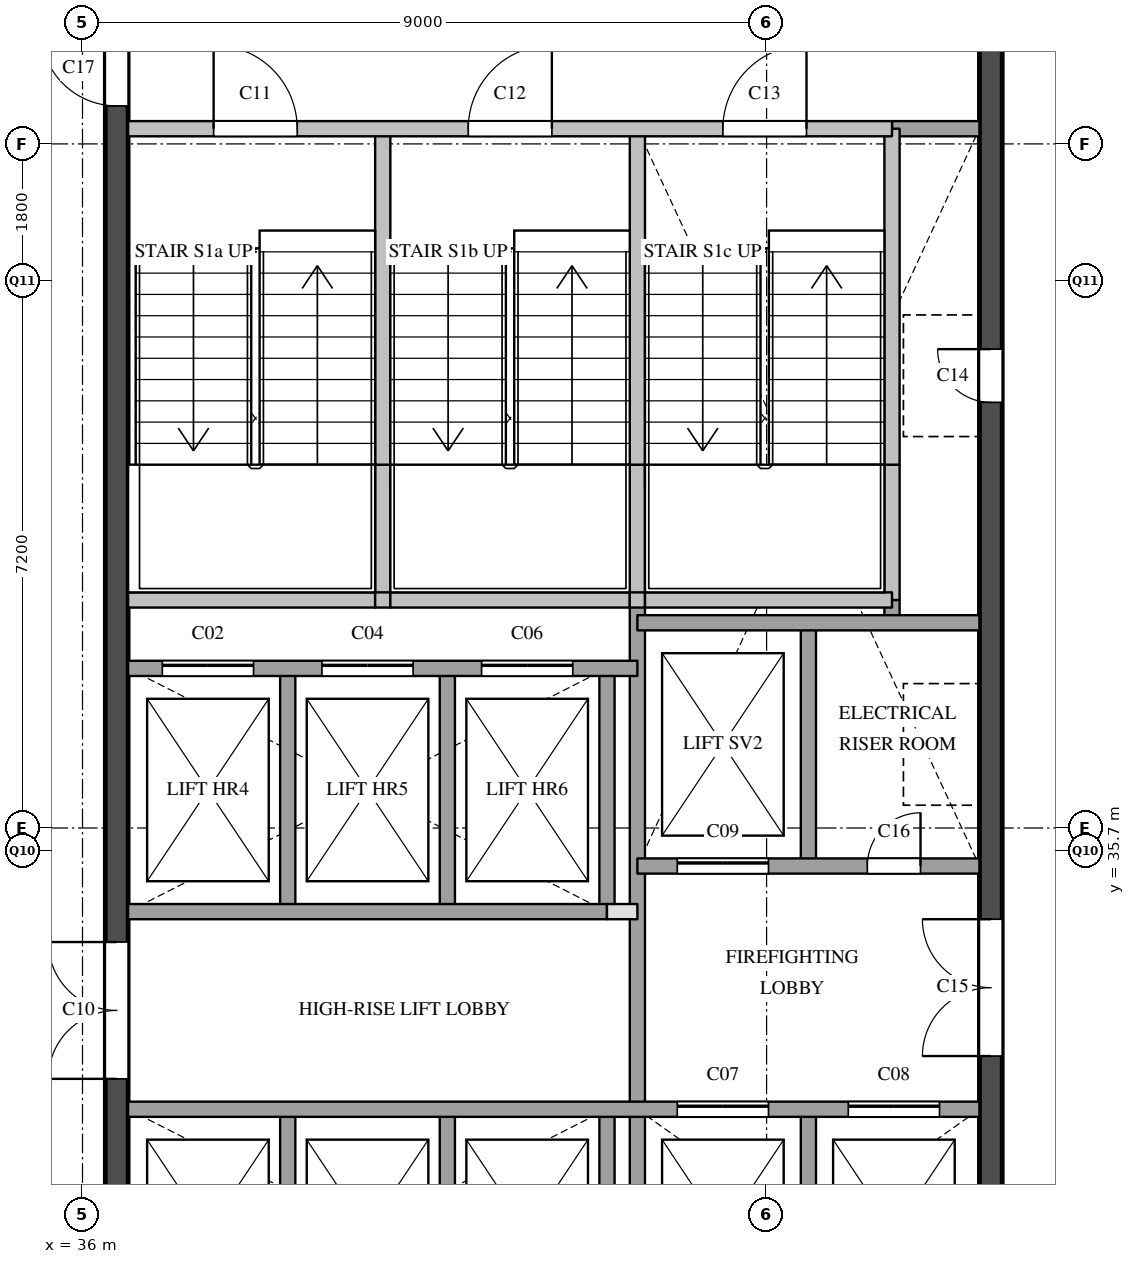
"""IFC4 building model, lengths in metres.
Left out: names, types, materials, properties, quantities, classifications, styles, units other than length and angle.
Written with IfcOpenShell. Run it as: python <this file> out.ifc"""

import sys

from ifc_helpers import new_model, si_unit, direction, frame, frame_2d, origin, place, context, subcontext, project, spatial, rectangle, extrude, element, fill, save


model = new_model("IFC4")
c1 = context("Model", 3, precision=1e-05, world=origin(), true_north=direction((0.0, 1.0)))
c2 = subcontext(c1, "Body", "Model", "MODEL_VIEW")
j1 = project(units=[si_unit("LENGTHUNIT", "METRE"), si_unit("PLANEANGLEUNIT", "RADIAN")], contexts=[c1])
p1 = place(None, origin())
s1 = spatial("IfcSite", under=j1, at=p1, CompositionType="ELEMENT")
p2 = place(p1, origin())
s2 = spatial("IfcBuilding", under=s1, at=p2, CompositionType="ELEMENT")
p3 = place(p2, frame((0.0, 0.0, 305.1)))
s3 = spatial("IfcBuildingStorey", under=s2, at=p3, CompositionType="ELEMENT", Elevation=305.1)
p4 = place(p3, frame((36.45, 29.1, 0.0), z_axis=(0.0, 0.0, 1.0), x_axis=(0.0, 1.0, 0.0)))
e1 = element("IfcWall", 1, at=p4, inside=s3, PredefinedType="SHEAR", context=c2, shape_type="SweptSolid", body=[
    extrude(rectangle(XDim=20.3, YDim=0.3, at=frame_2d((10.15, 0.0))), origin(), (0.0, 0.0, 1.0), 3.6),
])
p5 = place(p4, frame((3.6, 0.0, 0.0)))
e2 = element("IfcOpeningElement", 2, at=p5, cuts=e1, PredefinedType="OPENING", context=c2, shape_type="SweptSolid", body=[
    extrude(rectangle(XDim=1.8, YDim=2.1, at=frame_2d((0.9, 1.05))), frame((0.0, 0.16, 0.0), z_axis=(0.0, -1.0, 0.0), x_axis=(1.0, 0.0, 0.0)), (0.0, 0.0, 1.0), 0.32),
])
p6 = place(p4, frame((16.4, 0.0, 0.0)))
e3 = element("IfcOpeningElement", 3, at=p6, cuts=e1, PredefinedType="OPENING", context=c2, shape_type="SweptSolid", body=[
    extrude(rectangle(XDim=1.0, YDim=2.1, at=frame_2d((0.5, 1.05))), frame((0.0, 0.16, 0.0), z_axis=(0.0, -1.0, 0.0), x_axis=(1.0, 0.0, 0.0)), (0.0, 0.0, 1.0), 0.32),
])
p7 = place(p3, frame((47.95, 29.1, 0.0), z_axis=(0.0, 0.0, 1.0), x_axis=(0.0, 1.0, 0.0)))
e4 = element("IfcWall", 4, at=p7, inside=s3, PredefinedType="SHEAR", context=c2, shape_type="SweptSolid", body=[
    extrude(rectangle(XDim=20.3, YDim=0.3, at=frame_2d((10.15, 0.0))), origin(), (0.0, 0.0, 1.0), 3.6),
])
p8 = place(p7, frame((12.5, 0.0, 0.0)))
e5 = element("IfcOpeningElement", 5, at=p8, cuts=e4, PredefinedType="OPENING", context=c2, shape_type="SweptSolid", body=[
    extrude(rectangle(XDim=0.7, YDim=2.1, at=frame_2d((0.35, 1.05))), frame((0.0, 0.16, 0.0), z_axis=(0.0, -1.0, 0.0), x_axis=(1.0, 0.0, 0.0)), (0.0, 0.0, 1.0), 0.32),
])
p9 = place(p7, frame((3.9, 0.0, 0.0)))
e6 = element("IfcOpeningElement", 6, at=p9, cuts=e4, PredefinedType="OPENING", context=c2, shape_type="SweptSolid", body=[
    extrude(rectangle(XDim=1.8, YDim=2.1, at=frame_2d((0.9, 1.05))), frame((0.0, 0.16, 0.0), z_axis=(0.0, -1.0, 0.0), x_axis=(1.0, 0.0, 0.0)), (0.0, 0.0, 1.0), 0.32),
])
p10 = place(p3, frame((38.7, 29.1, 0.0), z_axis=(0.0, 0.0, 1.0), x_axis=(0.0, 1.0, 0.0)))
e7 = element("IfcWall", 7, at=p10, inside=s3, PredefinedType="SOLIDWALL", context=c2, shape_type="SweptSolid", body=[
    extrude(rectangle(XDim=3.2, YDim=0.2, at=frame_2d((1.6, 0.0))), origin(), (0.0, 0.0, 1.0), 3.6),
])
p11 = place(p3, frame((38.7, 34.9, 0.0), z_axis=(0.0, 0.0, 1.0), x_axis=(0.0, 1.0, 0.0)))
e8 = element("IfcWall", 8, at=p11, inside=s3, PredefinedType="SOLIDWALL", context=c2, shape_type="SweptSolid", body=[
    extrude(rectangle(XDim=3.2, YDim=0.2, at=frame_2d((1.6, 0.0))), origin(), (0.0, 0.0, 1.0), 3.6),
])
p12 = place(p3, frame((39.95, 39.0, 0.0), z_axis=(0.0, 0.0, 1.0), x_axis=(0.0, 1.0, 0.0)))
e9 = element("IfcWall", 9, at=p12, inside=s3, PredefinedType="SOLIDWALL", context=c2, shape_type="SweptSolid", body=[
    extrude(rectangle(XDim=1.78, YDim=0.2, at=frame_2d((0.89, 0.0))), origin(), (0.0, 0.0, 1.0), 3.6),
])
p13 = place(p3, frame((39.95, 40.78, 0.0), z_axis=(0.0, 0.0, 1.0), x_axis=(0.0, 1.0, 0.0)))
e10 = element("IfcWall", 10, at=p13, inside=s3, PredefinedType="SOLIDWALL", context=c2, shape_type="SweptSolid", body=[
    extrude(rectangle(XDim=4.42, YDim=0.2, at=frame_2d((2.21, 0.0))), origin(), (0.0, 0.0, 1.0), 3.6),
])
p14 = place(p3, frame((40.8, 29.1, 0.0), z_axis=(0.0, 0.0, 1.0), x_axis=(0.0, 1.0, 0.0)))
e11 = element("IfcWall", 11, at=p14, inside=s3, PredefinedType="SOLIDWALL", context=c2, shape_type="SweptSolid", body=[
    extrude(rectangle(XDim=3.2, YDim=0.2, at=frame_2d((1.6, 0.0))), origin(), (0.0, 0.0, 1.0), 3.6),
])
p15 = place(p3, frame((40.8, 34.9, 0.0), z_axis=(0.0, 0.0, 1.0), x_axis=(0.0, 1.0, 0.0)))
e12 = element("IfcWall", 12, at=p15, inside=s3, PredefinedType="SOLIDWALL", context=c2, shape_type="SweptSolid", body=[
    extrude(rectangle(XDim=3.2, YDim=0.2, at=frame_2d((1.6, 0.0))), origin(), (0.0, 0.0, 1.0), 3.6),
])
p16 = place(p3, frame((42.9, 29.1, 0.0), z_axis=(0.0, 0.0, 1.0), x_axis=(0.0, 1.0, 0.0)))
e13 = element("IfcWall", 13, at=p16, inside=s3, PredefinedType="SOLIDWALL", context=c2, shape_type="SweptSolid", body=[
    extrude(rectangle(XDim=3.2, YDim=0.2, at=frame_2d((1.6, 0.0))), origin(), (0.0, 0.0, 1.0), 3.6),
])
p17 = place(p3, frame((42.9, 34.9, 0.0), z_axis=(0.0, 0.0, 1.0), x_axis=(0.0, 1.0, 0.0)))
e14 = element("IfcWall", 14, at=p17, inside=s3, PredefinedType="SOLIDWALL", context=c2, shape_type="SweptSolid", body=[
    extrude(rectangle(XDim=3.2, YDim=0.2, at=frame_2d((1.6, 0.0))), origin(), (0.0, 0.0, 1.0), 3.6),
])
p18 = place(p3, frame((43.3, 29.1, 0.0), z_axis=(0.0, 0.0, 1.0), x_axis=(0.0, 1.0, 0.0)))
e15 = element("IfcWall", 15, at=p18, inside=s3, PredefinedType="SOLIDWALL", context=c2, shape_type="SweptSolid", body=[
    extrude(rectangle(XDim=9.9, YDim=0.2, at=frame_2d((4.95, 0.0))), origin(), (0.0, 0.0, 1.0), 3.6),
])
p19 = place(p3, frame((43.3, 39.0, 0.0), z_axis=(0.0, 0.0, 1.0), x_axis=(0.0, 1.0, 0.0)))
e16 = element("IfcWall", 16, at=p19, inside=s3, PredefinedType="SOLIDWALL", context=c2, shape_type="SweptSolid", body=[
    extrude(rectangle(XDim=1.78, YDim=0.2, at=frame_2d((0.89, 0.0))), origin(), (0.0, 0.0, 1.0), 3.6),
])
p20 = place(p3, frame((43.3, 40.78, 0.0), z_axis=(0.0, 0.0, 1.0), x_axis=(0.0, 1.0, 0.0)))
e17 = element("IfcWall", 17, at=p20, inside=s3, PredefinedType="SOLIDWALL", context=c2, shape_type="SweptSolid", body=[
    extrude(rectangle(XDim=4.42, YDim=0.2, at=frame_2d((2.21, 0.0))), origin(), (0.0, 0.0, 1.0), 3.6),
])
for number, where, z_axis, x_axis in (
    (18, (45.55, 29.1, 0.0), (0.0, 0.0, 1.0), (0.0, 1.0, 0.0)),
    (19, (45.55, 35.5, 0.0), (0.0, 0.0, 1.0), (0.0, 1.0, 0.0)),
):
    element("IfcWall", number, at=place(p3, frame(where, z_axis=z_axis, x_axis=x_axis)), inside=s3, PredefinedType="SOLIDWALL", context=c2, shape_type="SweptSolid", body=[
        extrude(rectangle(XDim=3.2, YDim=0.2, at=frame_2d((1.6, 0.0))), origin(), (0.0, 0.0, 1.0), 3.6),
    ])
p21 = place(p3, frame((46.65, 38.7, 0.0), z_axis=(0.0, 0.0, 1.0), x_axis=(0.0, 1.0, 0.0)))
e20 = element("IfcWall", 20, at=p21, inside=s3, PredefinedType="SOLIDWALL", context=c2, shape_type="SweptSolid", body=[
    extrude(rectangle(XDim=0.3, YDim=0.2, at=frame_2d((0.15, 0.0))), origin(), (0.0, 0.0, 1.0), 3.6),
])
p22 = place(p3, frame((46.65, 39.0, 0.0), z_axis=(0.0, 0.0, 1.0), x_axis=(0.0, 1.0, 0.0)))
e21 = element("IfcWall", 21, at=p22, inside=s3, PredefinedType="SOLIDWALL", context=c2, shape_type="SweptSolid", body=[
    extrude(rectangle(XDim=1.78, YDim=0.2, at=frame_2d((0.89, 0.0))), origin(), (0.0, 0.0, 1.0), 3.6),
])
p23 = place(p3, frame((46.65, 40.78, 0.0), z_axis=(0.0, 0.0, 1.0), x_axis=(0.0, 1.0, 0.0)))
e22 = element("IfcWall", 22, at=p23, inside=s3, PredefinedType="SOLIDWALL", context=c2, shape_type="SweptSolid", body=[
    extrude(rectangle(XDim=4.42, YDim=0.2, at=frame_2d((2.21, 0.0))), origin(), (0.0, 0.0, 1.0), 3.6),
])
p24 = place(p3, frame((36.6, 32.3, 0.0), z_axis=(0.0, 0.0, 1.0), x_axis=(1.0, 0.0, 0.0)))
e23 = element("IfcWall", 23, at=p24, inside=s3, PredefinedType="SOLIDWALL", context=c2, shape_type="SweptSolid", body=[
    extrude(rectangle(XDim=11.2, YDim=0.2, at=frame_2d((5.6, 0.0))), origin(), (0.0, 0.0, 1.0), 3.6),
])
p25 = place(p24, frame((7.225, 0.0, 0.0)))
e24 = element("IfcOpeningElement", 24, at=p25, cuts=e23, PredefinedType="OPENING", context=c2, shape_type="SweptSolid", body=[
    extrude(rectangle(XDim=1.2, YDim=2.1, at=frame_2d((0.6, 1.05))), frame((0.0, 0.11, 0.0), z_axis=(0.0, -1.0, 0.0), x_axis=(1.0, 0.0, 0.0)), (0.0, 0.0, 1.0), 0.22),
])
p26 = place(p24, frame((9.475, 0.0, 0.0)))
e25 = element("IfcOpeningElement", 25, at=p26, cuts=e23, PredefinedType="OPENING", context=c2, shape_type="SweptSolid", body=[
    extrude(rectangle(XDim=1.2, YDim=2.1, at=frame_2d((0.6, 1.05))), frame((0.0, 0.11, 0.0), z_axis=(0.0, -1.0, 0.0), x_axis=(1.0, 0.0, 0.0)), (0.0, 0.0, 1.0), 0.22),
])
p27 = place(p3, frame((42.9, 34.9, 0.0), z_axis=(0.0, 0.0, 1.0), x_axis=(1.0, 0.0, 0.0)))
e26 = element("IfcWall", 26, at=p27, inside=s3, PredefinedType="PARTITIONING", context=c2, shape_type="SweptSolid", body=[
    extrude(rectangle(XDim=0.4, YDim=0.2, at=frame_2d((0.2, 0.0))), origin(), (0.0, 0.0, 1.0), 3.6),
])
p28 = place(p3, frame((36.6, 34.9, 0.0), z_axis=(0.0, 0.0, 1.0), x_axis=(1.0, 0.0, 0.0)))
e27 = element("IfcWall", 27, at=p28, inside=s3, PredefinedType="SOLIDWALL", context=c2, shape_type="SweptSolid", body=[
    extrude(rectangle(XDim=6.3, YDim=0.2, at=frame_2d((3.15, 0.0))), origin(), (0.0, 0.0, 1.0), 3.6),
])
p29 = place(p3, frame((43.3, 35.5, 0.0), z_axis=(0.0, 0.0, 1.0), x_axis=(1.0, 0.0, 0.0)))
e28 = element("IfcWall", 28, at=p29, inside=s3, PredefinedType="SOLIDWALL", context=c2, shape_type="SweptSolid", body=[
    extrude(rectangle(XDim=4.5, YDim=0.2, at=frame_2d((2.25, 0.0))), origin(), (0.0, 0.0, 1.0), 3.6),
])
p30 = place(p29, frame((0.525, 0.0, 0.0)))
e29 = element("IfcOpeningElement", 29, at=p30, cuts=e28, PredefinedType="OPENING", context=c2, shape_type="SweptSolid", body=[
    extrude(rectangle(XDim=1.2, YDim=2.1, at=frame_2d((0.6, 1.05))), frame((0.0, 0.11, 0.0), z_axis=(0.0, -1.0, 0.0), x_axis=(1.0, 0.0, 0.0)), (0.0, 0.0, 1.0), 0.22),
])
p31 = place(p29, frame((3.025, 0.0, 0.0)))
e30 = element("IfcOpeningElement", 30, at=p31, cuts=e28, PredefinedType="OPENING", context=c2, shape_type="SweptSolid", body=[
    extrude(rectangle(XDim=0.7, YDim=2.1, at=frame_2d((0.35, 1.05))), frame((0.0, 0.11, 0.0), z_axis=(0.0, -1.0, 0.0), x_axis=(1.0, 0.0, 0.0)), (0.0, 0.0, 1.0), 0.22),
])
p32 = place(p3, frame((36.6, 38.1, 0.0), z_axis=(0.0, 0.0, 1.0), x_axis=(1.0, 0.0, 0.0)))
e31 = element("IfcWall", 31, at=p32, inside=s3, PredefinedType="SOLIDWALL", context=c2, shape_type="SweptSolid", body=[
    extrude(rectangle(XDim=6.7, YDim=0.2, at=frame_2d((3.35, 0.0))), origin(), (0.0, 0.0, 1.0), 3.6),
])
p33 = place(p32, frame((0.45, 0.0, 0.0)))
e32 = element("IfcOpeningElement", 32, at=p33, cuts=e31, PredefinedType="OPENING", context=c2, shape_type="SweptSolid", body=[
    extrude(rectangle(XDim=1.2, YDim=2.1, at=frame_2d((0.6, 1.05))), frame((0.0, 0.11, 0.0), z_axis=(0.0, -1.0, 0.0), x_axis=(1.0, 0.0, 0.0)), (0.0, 0.0, 1.0), 0.22),
])
p34 = place(p32, frame((2.55, 0.0, 0.0)))
e33 = element("IfcOpeningElement", 33, at=p34, cuts=e31, PredefinedType="OPENING", context=c2, shape_type="SweptSolid", body=[
    extrude(rectangle(XDim=1.2, YDim=2.1, at=frame_2d((0.6, 1.05))), frame((0.0, 0.11, 0.0), z_axis=(0.0, -1.0, 0.0), x_axis=(1.0, 0.0, 0.0)), (0.0, 0.0, 1.0), 0.22),
])
p35 = place(p32, frame((4.65, 0.0, 0.0)))
e34 = element("IfcOpeningElement", 34, at=p35, cuts=e31, PredefinedType="OPENING", context=c2, shape_type="SweptSolid", body=[
    extrude(rectangle(XDim=1.2, YDim=2.1, at=frame_2d((0.6, 1.05))), frame((0.0, 0.11, 0.0), z_axis=(0.0, -1.0, 0.0), x_axis=(1.0, 0.0, 0.0)), (0.0, 0.0, 1.0), 0.22),
])
p36 = place(p3, frame((43.3, 38.7, 0.0), z_axis=(0.0, 0.0, 1.0), x_axis=(1.0, 0.0, 0.0)))
e35 = element("IfcWall", 35, at=p36, inside=s3, PredefinedType="SOLIDWALL", context=c2, shape_type="SweptSolid", body=[
    extrude(rectangle(XDim=4.5, YDim=0.2, at=frame_2d((2.25, 0.0))), origin(), (0.0, 0.0, 1.0), 3.6),
])
p37 = place(p3, frame((36.6, 39.0, 0.0), z_axis=(0.0, 0.0, 1.0), x_axis=(1.0, 0.0, 0.0)))
e36 = element("IfcWall", 36, at=p37, inside=s3, PredefinedType="SOLIDWALL", context=c2, shape_type="SweptSolid", body=[
    extrude(rectangle(XDim=3.25, YDim=0.2, at=frame_2d((1.625, 0.0))), origin(), (0.0, 0.0, 1.0), 3.6),
])
p38 = place(p3, frame((39.85, 39.0, 0.0), z_axis=(0.0, 0.0, 1.0), x_axis=(1.0, 0.0, 0.0)))
e37 = element("IfcWall", 37, at=p38, inside=s3, PredefinedType="SOLIDWALL", context=c2, shape_type="SweptSolid", body=[
    extrude(rectangle(XDim=0.2, YDim=0.2, at=frame_2d((0.1, 0.0))), origin(), (0.0, 0.0, 1.0), 3.6),
])
p39 = place(p3, frame((40.05, 39.0, 0.0), z_axis=(0.0, 0.0, 1.0), x_axis=(1.0, 0.0, 0.0)))
e38 = element("IfcWall", 38, at=p39, inside=s3, PredefinedType="SOLIDWALL", context=c2, shape_type="SweptSolid", body=[
    extrude(rectangle(XDim=3.15, YDim=0.2, at=frame_2d((1.575, 0.0))), origin(), (0.0, 0.0, 1.0), 3.6),
])
p40 = place(p3, frame((43.2, 39.0, 0.0), z_axis=(0.0, 0.0, 1.0), x_axis=(1.0, 0.0, 0.0)))
e39 = element("IfcWall", 39, at=p40, inside=s3, PredefinedType="SOLIDWALL", context=c2, shape_type="SweptSolid", body=[
    extrude(rectangle(XDim=0.2, YDim=0.2, at=frame_2d((0.1, 0.0))), origin(), (0.0, 0.0, 1.0), 3.6),
])
p41 = place(p3, frame((43.4, 39.0, 0.0), z_axis=(0.0, 0.0, 1.0), x_axis=(1.0, 0.0, 0.0)))
e40 = element("IfcWall", 40, at=p41, inside=s3, PredefinedType="SOLIDWALL", context=c2, shape_type="SweptSolid", body=[
    extrude(rectangle(XDim=3.25, YDim=0.2, at=frame_2d((1.625, 0.0))), origin(), (0.0, 0.0, 1.0), 3.6),
])
p42 = place(p3, frame((46.65, 45.2, 0.0), z_axis=(0.0, 0.0, 1.0), x_axis=(1.0, 0.0, 0.0)))
e41 = element("IfcWall", 41, at=p42, inside=s3, PredefinedType="SOLIDWALL", context=c2, shape_type="SweptSolid", body=[
    extrude(rectangle(XDim=1.15, YDim=0.2, at=frame_2d((0.575, 0.0))), origin(), (0.0, 0.0, 1.0), 3.6),
])
p43 = place(p3, frame((36.6, 45.2, 0.0), z_axis=(0.0, 0.0, 1.0), x_axis=(1.0, 0.0, 0.0)))
e42 = element("IfcWall", 42, at=p43, inside=s3, PredefinedType="SOLIDWALL", context=c2, shape_type="SweptSolid", body=[
    extrude(rectangle(XDim=10.05, YDim=0.2, at=frame_2d((5.025, 0.0))), origin(), (0.0, 0.0, 1.0), 3.6),
])
p44 = place(p43, frame((1.125, 0.0, 0.0)))
e43 = element("IfcOpeningElement", 43, at=p44, cuts=e42, PredefinedType="OPENING", context=c2, shape_type="SweptSolid", body=[
    extrude(rectangle(XDim=1.1, YDim=2.1, at=frame_2d((0.55, 1.05))), frame((0.0, 0.11, 0.0), z_axis=(0.0, -1.0, 0.0), x_axis=(1.0, 0.0, 0.0)), (0.0, 0.0, 1.0), 0.22),
])
p45 = place(p43, frame((4.475, 0.0, 0.0)))
e44 = element("IfcOpeningElement", 44, at=p45, cuts=e42, PredefinedType="OPENING", context=c2, shape_type="SweptSolid", body=[
    extrude(rectangle(XDim=1.1, YDim=2.1, at=frame_2d((0.55, 1.05))), frame((0.0, 0.11, 0.0), z_axis=(0.0, -1.0, 0.0), x_axis=(1.0, 0.0, 0.0)), (0.0, 0.0, 1.0), 0.22),
])
p46 = place(p43, frame((7.825, 0.0, 0.0)))
e45 = element("IfcOpeningElement", 45, at=p46, cuts=e42, PredefinedType="OPENING", context=c2, shape_type="SweptSolid", body=[
    extrude(rectangle(XDim=1.1, YDim=2.1, at=frame_2d((0.55, 1.05))), frame((0.0, 0.11, 0.0), z_axis=(0.0, -1.0, 0.0), x_axis=(1.0, 0.0, 0.0)), (0.0, 0.0, 1.0), 0.22),
])
p47 = place(p33, origin())
e46 = element("IfcDoor", 46, at=p47, inside=s3, OperationType="SLIDING_TO_LEFT", PredefinedType="DOOR", context=c2, shape_type="SweptSolid", body=[
    extrude(rectangle(XDim=1.2, YDim=2.1, at=frame_2d((0.6, 1.05))), frame((0.0, 0.025, 0.0), z_axis=(0.0, -1.0, 0.0), x_axis=(1.0, 0.0, 0.0)), (0.0, 0.0, 1.0), 0.05),
])
fill(e32, e46)
p48 = place(p34, origin())
e47 = element("IfcDoor", 47, at=p48, inside=s3, OperationType="SLIDING_TO_LEFT", PredefinedType="DOOR", context=c2, shape_type="SweptSolid", body=[
    extrude(rectangle(XDim=1.2, YDim=2.1, at=frame_2d((0.6, 1.05))), frame((0.0, 0.025, 0.0), z_axis=(0.0, -1.0, 0.0), x_axis=(1.0, 0.0, 0.0)), (0.0, 0.0, 1.0), 0.05),
])
fill(e33, e47)
p49 = place(p35, origin())
e48 = element("IfcDoor", 48, at=p49, inside=s3, OperationType="SLIDING_TO_LEFT", PredefinedType="DOOR", context=c2, shape_type="SweptSolid", body=[
    extrude(rectangle(XDim=1.2, YDim=2.1, at=frame_2d((0.6, 1.05))), frame((0.0, 0.025, 0.0), z_axis=(0.0, -1.0, 0.0), x_axis=(1.0, 0.0, 0.0)), (0.0, 0.0, 1.0), 0.05),
])
fill(e34, e48)
p50 = place(p25, origin())
e49 = element("IfcDoor", 49, at=p50, inside=s3, OperationType="SLIDING_TO_LEFT", PredefinedType="DOOR", context=c2, shape_type="SweptSolid", body=[
    extrude(rectangle(XDim=1.2, YDim=2.1, at=frame_2d((0.6, 1.05))), frame((0.0, 0.025, 0.0), z_axis=(0.0, -1.0, 0.0), x_axis=(1.0, 0.0, 0.0)), (0.0, 0.0, 1.0), 0.05),
])
fill(e24, e49)
p51 = place(p26, origin())
e50 = element("IfcDoor", 50, at=p51, inside=s3, OperationType="SLIDING_TO_LEFT", PredefinedType="DOOR", context=c2, shape_type="SweptSolid", body=[
    extrude(rectangle(XDim=1.2, YDim=2.1, at=frame_2d((0.6, 1.05))), frame((0.0, 0.025, 0.0), z_axis=(0.0, -1.0, 0.0), x_axis=(1.0, 0.0, 0.0)), (0.0, 0.0, 1.0), 0.05),
])
fill(e25, e50)
p52 = place(p30, origin())
e51 = element("IfcDoor", 51, at=p52, inside=s3, OperationType="SLIDING_TO_LEFT", PredefinedType="DOOR", context=c2, shape_type="SweptSolid", body=[
    extrude(rectangle(XDim=1.2, YDim=2.1, at=frame_2d((0.6, 1.05))), frame((0.0, 0.025, 0.0), z_axis=(0.0, -1.0, 0.0), x_axis=(1.0, 0.0, 0.0)), (0.0, 0.0, 1.0), 0.05),
])
fill(e29, e51)
p53 = place(p5, origin())
e52 = element("IfcDoor", 52, at=p53, inside=s3, OperationType="DOUBLE_DOOR_SINGLE_SWING", PredefinedType="DOOR", context=c2, shape_type="SweptSolid", body=[
    extrude(rectangle(XDim=1.8, YDim=2.1, at=frame_2d((0.9, 1.05))), frame((0.0, 0.025, 0.0), z_axis=(0.0, -1.0, 0.0), x_axis=(1.0, 0.0, 0.0)), (0.0, 0.0, 1.0), 0.05),
])
fill(e2, e52)
p54 = place(p44, origin())
e53 = element("IfcDoor", 53, at=p54, inside=s3, OperationType="SINGLE_SWING_LEFT", PredefinedType="DOOR", context=c2, shape_type="SweptSolid", body=[
    extrude(rectangle(XDim=1.1, YDim=2.1, at=frame_2d((0.55, 1.05))), frame((0.0, 0.025, 0.0), z_axis=(0.0, -1.0, 0.0), x_axis=(1.0, 0.0, 0.0)), (0.0, 0.0, 1.0), 0.05),
])
fill(e43, e53)
p55 = place(p45, origin())
e54 = element("IfcDoor", 54, at=p55, inside=s3, OperationType="SINGLE_SWING_RIGHT", PredefinedType="DOOR", context=c2, shape_type="SweptSolid", body=[
    extrude(rectangle(XDim=1.1, YDim=2.1, at=frame_2d((0.55, 1.05))), frame((0.0, 0.025, 0.0), z_axis=(0.0, -1.0, 0.0), x_axis=(1.0, 0.0, 0.0)), (0.0, 0.0, 1.0), 0.05),
])
fill(e44, e54)
p56 = place(p46, origin())
e55 = element("IfcDoor", 55, at=p56, inside=s3, OperationType="SINGLE_SWING_RIGHT", PredefinedType="DOOR", context=c2, shape_type="SweptSolid", body=[
    extrude(rectangle(XDim=1.1, YDim=2.1, at=frame_2d((0.55, 1.05))), frame((0.0, 0.025, 0.0), z_axis=(0.0, -1.0, 0.0), x_axis=(1.0, 0.0, 0.0)), (0.0, 0.0, 1.0), 0.05),
])
fill(e45, e55)
p57 = place(p8, origin())
e56 = element("IfcDoor", 56, at=p57, inside=s3, OperationType="SINGLE_SWING_RIGHT", PredefinedType="DOOR", context=c2, shape_type="SweptSolid", body=[
    extrude(rectangle(XDim=0.7, YDim=2.1, at=frame_2d((0.35, 1.05))), frame((0.0, 0.025, 0.0), z_axis=(0.0, -1.0, 0.0), x_axis=(1.0, 0.0, 0.0)), (0.0, 0.0, 1.0), 0.05),
])
fill(e5, e56)
p58 = place(p9, origin())
e57 = element("IfcDoor", 57, at=p58, inside=s3, OperationType="DOUBLE_DOOR_SINGLE_SWING", PredefinedType="DOOR", context=c2, shape_type="SweptSolid", body=[
    extrude(rectangle(XDim=1.8, YDim=2.1, at=frame_2d((0.9, 1.05))), frame((0.0, 0.025, 0.0), z_axis=(0.0, -1.0, 0.0), x_axis=(1.0, 0.0, 0.0)), (0.0, 0.0, 1.0), 0.05),
])
fill(e6, e57)
p59 = place(p31, origin())
e58 = element("IfcDoor", 58, at=p59, inside=s3, OperationType="SINGLE_SWING_RIGHT", PredefinedType="DOOR", context=c2, shape_type="SweptSolid", body=[
    extrude(rectangle(XDim=0.7, YDim=2.1, at=frame_2d((0.35, 1.05))), frame((0.0, 0.025, 0.0), z_axis=(0.0, -1.0, 0.0), x_axis=(1.0, 0.0, 0.0)), (0.0, 0.0, 1.0), 0.05),
])
fill(e30, e58)
p60 = place(p6, origin())
e59 = element("IfcDoor", 59, at=p60, inside=s3, OperationType="SINGLE_SWING_RIGHT", PredefinedType="DOOR", context=c2, shape_type="SweptSolid", body=[
    extrude(rectangle(XDim=1.0, YDim=2.1, at=frame_2d((0.5, 1.05))), frame((0.0, 0.025, 0.0), z_axis=(0.0, -1.0, 0.0), x_axis=(1.0, 0.0, 0.0)), (0.0, 0.0, 1.0), 0.05),
])
fill(e3, e59)
save(model, sys.argv[1])
